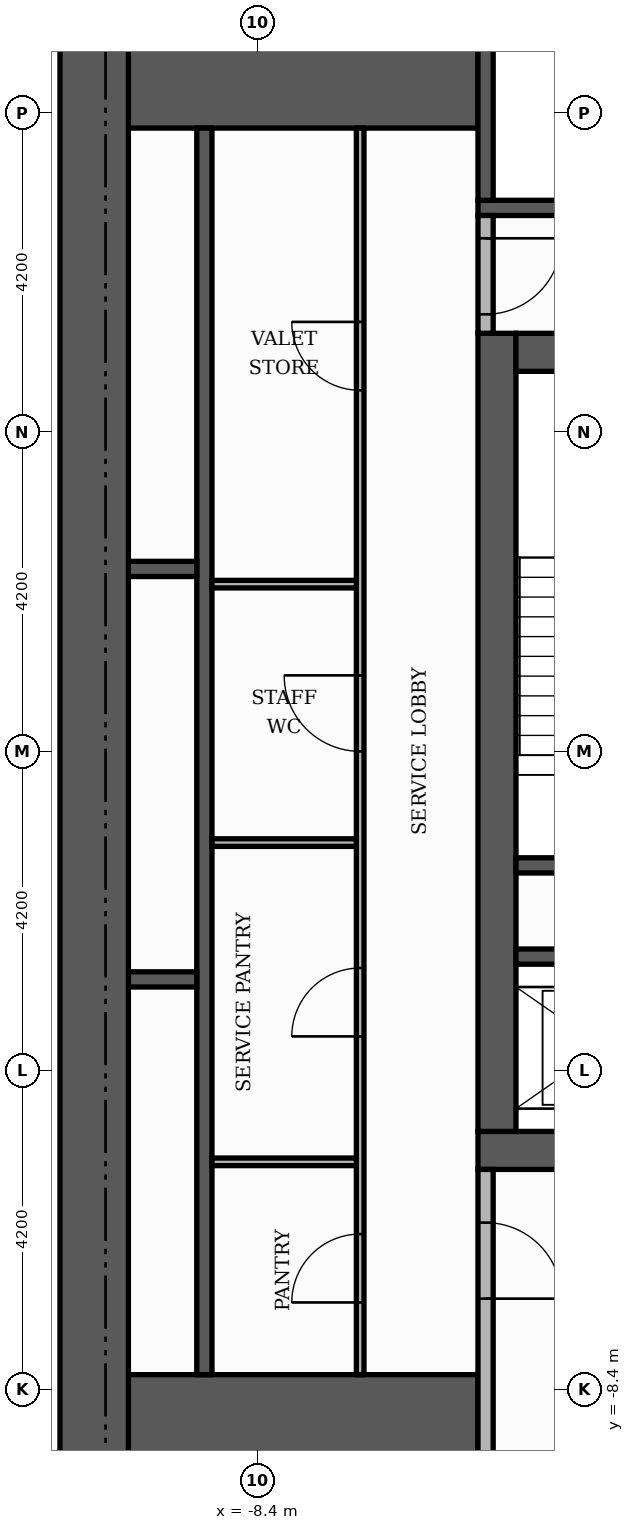
"""IFC4 building model, lengths in metres.
Left out: names, types, materials, properties, quantities, classifications, styles, units other than length and angle.
Written with IfcOpenShell. Run it as: python <this file> out.ifc"""

import sys

from ifc_helpers import new_model, si_unit, direction, frame, frame_2d, origin, place, context, subcontext, project, spatial, rectangle, extrude, element, fill, save


model = new_model("IFC4")
c1 = context("Model", 3, precision=1e-05, world=origin(), true_north=direction((0.0, 1.0)))
c2 = subcontext(c1, "Body", "Model", "MODEL_VIEW")
j1 = project(units=[si_unit("LENGTHUNIT", "METRE"), si_unit("PLANEANGLEUNIT", "RADIAN")], contexts=[c1])
p1 = place(None, origin())
s1 = spatial("IfcSite", under=j1, at=p1, CompositionType="ELEMENT")
p2 = place(p1, origin())
s2 = spatial("IfcBuilding", under=s1, at=p2, CompositionType="ELEMENT")
p3 = place(p2, frame((0.0, 0.0, 219.6)))
s3 = spatial("IfcBuildingStorey", under=s2, at=p3, CompositionType="ELEMENT", Elevation=219.6)
p4 = place(p3, frame((-5.5, -5.25, 0.0), z_axis=(0.0, 0.0, 1.0), x_axis=(1.0, 0.0, 0.0)))
e1 = element("IfcWall", 1, at=p4, inside=s3, PredefinedType="SHEAR", context=c2, shape_type="SweptSolid", body=[
    extrude(rectangle(XDim=11.0, YDim=0.5, at=frame_2d((5.5, 0.0))), origin(), (0.0, 0.0, 1.0), 3.48),
])
p5 = place(p4, frame((4.9, 0.0, 0.0)))
e2 = element("IfcOpeningElement", 2, at=p5, cuts=e1, PredefinedType="OPENING", context=c2, shape_type="SweptSolid", body=[
    extrude(rectangle(XDim=1.2, YDim=2.1, at=frame_2d((0.6, 1.05))), frame((0.0, 0.26, 0.0), z_axis=(0.0, -1.0, 0.0), x_axis=(1.0, 0.0, 0.0)), (0.0, 0.0, 1.0), 0.52),
])
p6 = place(p3, frame((-5.25, -5.0, 0.0), z_axis=(0.0, 0.0, 1.0), x_axis=(0.0, 1.0, 0.0)))
e3 = element("IfcWall", 3, at=p6, inside=s3, PredefinedType="SHEAR", context=c2, shape_type="SweptSolid", body=[
    extrude(rectangle(XDim=10.5, YDim=0.5, at=frame_2d((5.25, 0.0))), origin(), (0.0, 0.0, 1.0), 3.48),
])
p7 = place(p3, frame((-5.0, 5.25, 0.0), z_axis=(0.0, 0.0, 1.0), x_axis=(1.0, 0.0, 0.0)))
e4 = element("IfcWall", 4, at=p7, inside=s3, PredefinedType="SHEAR", context=c2, shape_type="SweptSolid", body=[
    extrude(rectangle(XDim=10.0, YDim=0.5, at=frame_2d((5.0, 0.0))), origin(), (0.0, 0.0, 1.0), 3.48),
])
p8 = place(p7, frame((4.4, 0.0, 0.0)))
e5 = element("IfcOpeningElement", 5, at=p8, cuts=e4, PredefinedType="OPENING", context=c2, shape_type="SweptSolid", body=[
    extrude(rectangle(XDim=1.2, YDim=2.1, at=frame_2d((0.6, 1.05))), frame((0.0, 0.26, 0.0), z_axis=(0.0, -1.0, 0.0), x_axis=(1.0, 0.0, 0.0)), (0.0, 0.0, 1.0), 0.52),
])
for number, where, z_axis, x_axis in (
    (6, (-10.1, -9.15, 0.0), (0.0, 0.0, 1.0), (1.0, 0.0, 0.0)),
    (7, (-10.1, 9.15, 0.0), (0.0, 0.0, 1.0), (1.0, 0.0, 0.0)),
):
    element("IfcWall", number, at=place(p3, frame(where, z_axis=z_axis, x_axis=x_axis)), inside=s3, PredefinedType="SHEAR", context=c2, shape_type="SweptSolid", body=[
        extrude(rectangle(XDim=4.6, YDim=1.9, at=frame_2d((2.3, 0.0))), origin(), (0.0, 0.0, 1.0), 3.48),
    ])
p9 = place(p3, frame((-5.0, -1.5, 0.0), z_axis=(0.0, 0.0, 1.0), x_axis=(1.0, 0.0, 0.0)))
e8 = element("IfcWall", 8, at=p9, inside=s3, PredefinedType="SHEAR", context=c2, shape_type="SweptSolid", body=[
    extrude(rectangle(XDim=3.05, YDim=0.2, at=frame_2d((1.525, 0.0))), origin(), (0.0, 0.0, 1.0), 3.48),
])
p10 = place(p3, frame((-5.5, 7.15, 0.0), z_axis=(0.0, 0.0, 1.0), x_axis=(1.0, 0.0, 0.0)))
e9 = element("IfcWall", 9, at=p10, inside=s3, PredefinedType="SHEAR", context=c2, shape_type="SweptSolid", body=[
    extrude(rectangle(XDim=6.8, YDim=0.2, at=frame_2d((3.4, 0.0))), origin(), (0.0, 0.0, 1.0), 3.48),
])
p11 = place(p3, frame((-5.4, 7.25, 0.0), z_axis=(0.0, 0.0, 1.0), x_axis=(0.0, 1.0, 0.0)))
e10 = element("IfcWall", 10, at=p11, inside=s3, PredefinedType="SHEAR", context=c2, shape_type="SweptSolid", body=[
    extrude(rectangle(XDim=2.85, YDim=0.2, at=frame_2d((1.425, 0.0))), origin(), (0.0, 0.0, 1.0), 3.48),
])
p12 = place(p3, frame((-9.1, -8.2, 0.0), z_axis=(0.0, 0.0, 1.0), x_axis=(0.0, 1.0, 0.0)))
e11 = element("IfcWall", 11, at=p12, inside=s3, PredefinedType="SHEAR", context=c2, shape_type="SweptSolid", body=[
    extrude(rectangle(XDim=16.4, YDim=0.2, at=frame_2d((8.2, 0.0))), origin(), (0.0, 0.0, 1.0), 3.48),
])
p13 = place(p3, frame((-10.1, -3.0, 0.0), z_axis=(0.0, 0.0, 1.0), x_axis=(1.0, 0.0, 0.0)))
e12 = element("IfcWall", 12, at=p13, inside=s3, PredefinedType="SHEAR", context=c2, shape_type="SweptSolid", body=[
    extrude(rectangle(XDim=0.9, YDim=0.2, at=frame_2d((0.45, 0.0))), origin(), (0.0, 0.0, 1.0), 3.48),
])
p14 = place(p3, frame((-5.0, -2.7, 0.0), z_axis=(0.0, 0.0, 1.0), x_axis=(1.0, 0.0, 0.0)))
e13 = element("IfcWall", 13, at=p14, inside=s3, PredefinedType="SHEAR", context=c2, shape_type="SweptSolid", body=[
    extrude(rectangle(XDim=2.85, YDim=0.2, at=frame_2d((1.425, 0.0))), origin(), (0.0, 0.0, 1.0), 3.48),
])
p15 = place(p3, frame((-10.1, 2.4, 0.0), z_axis=(0.0, 0.0, 1.0), x_axis=(1.0, 0.0, 0.0)))
e14 = element("IfcWall", 14, at=p15, inside=s3, PredefinedType="SHEAR", context=c2, shape_type="SweptSolid", body=[
    extrude(rectangle(XDim=0.9, YDim=0.2, at=frame_2d((0.45, 0.0))), origin(), (0.0, 0.0, 1.0), 3.48),
])
p16 = place(p3, frame((-10.55, -10.1, 0.0), z_axis=(0.0, 0.0, 1.0), x_axis=(0.0, 1.0, 0.0)))
e15 = element("IfcWall", 15, at=p16, inside=s3, PredefinedType="SHEAR", context=c2, shape_type="SweptSolid", body=[
    extrude(rectangle(XDim=20.2, YDim=0.9, at=frame_2d((10.1, 0.0))), origin(), (0.0, 0.0, 1.0), 3.48),
])
p17 = place(p3, frame((-5.4, -10.1, 0.0), z_axis=(0.0, 0.0, 1.0), x_axis=(0.0, 1.0, 0.0)))
e16 = element("IfcWall", 16, at=p17, inside=s3, PredefinedType="PARTITIONING", context=c2, shape_type="SweptSolid", body=[
    extrude(rectangle(XDim=4.6, YDim=0.2, at=frame_2d((2.3, 0.0))), origin(), (0.0, 0.0, 1.0), 3.48),
])
p18 = place(p17, frame((2.9, 0.0, 0.0)))
e17 = element("IfcOpeningElement", 17, at=p18, cuts=e16, PredefinedType="OPENING", context=c2, shape_type="SweptSolid", body=[
    extrude(rectangle(XDim=1.0, YDim=2.1, at=frame_2d((0.5, 1.05))), frame((0.0, 0.11, 0.0), z_axis=(0.0, -1.0, 0.0), x_axis=(1.0, 0.0, 0.0)), (0.0, 0.0, 1.0), 0.22),
])
p19 = place(p3, frame((-7.05, -8.2, 0.0), z_axis=(0.0, 0.0, 1.0), x_axis=(0.0, 1.0, 0.0)))
e18 = element("IfcWall", 18, at=p19, inside=s3, PredefinedType="PARTITIONING", context=c2, shape_type="SweptSolid", body=[
    extrude(rectangle(XDim=16.4, YDim=0.1, at=frame_2d((8.2, 0.0))), origin(), (0.0, 0.0, 1.0), 3.48),
])
p20 = place(p19, frame((0.95, 0.0, 0.0)))
e19 = element("IfcOpeningElement", 19, at=p20, cuts=e18, PredefinedType="OPENING", context=c2, shape_type="SweptSolid", body=[
    extrude(rectangle(XDim=0.9, YDim=2.1, at=frame_2d((0.45, 1.05))), frame((0.0, 0.06, 0.0), z_axis=(0.0, -1.0, 0.0), x_axis=(1.0, 0.0, 0.0)), (0.0, 0.0, 1.0), 0.12),
])
p21 = place(p19, frame((4.45, 0.0, 0.0)))
e20 = element("IfcOpeningElement", 20, at=p21, cuts=e18, PredefinedType="OPENING", context=c2, shape_type="SweptSolid", body=[
    extrude(rectangle(XDim=0.9, YDim=2.1, at=frame_2d((0.45, 1.05))), frame((0.0, 0.06, 0.0), z_axis=(0.0, -1.0, 0.0), x_axis=(1.0, 0.0, 0.0)), (0.0, 0.0, 1.0), 0.12),
])
p22 = place(p19, frame((8.2, 0.0, 0.0)))
e21 = element("IfcOpeningElement", 21, at=p22, cuts=e18, PredefinedType="OPENING", context=c2, shape_type="SweptSolid", body=[
    extrude(rectangle(XDim=1.0, YDim=2.1, at=frame_2d((0.5, 1.05))), frame((0.0, 0.06, 0.0), z_axis=(0.0, -1.0, 0.0), x_axis=(1.0, 0.0, 0.0)), (0.0, 0.0, 1.0), 0.12),
])
p23 = place(p19, frame((12.95, 0.0, 0.0)))
e22 = element("IfcOpeningElement", 22, at=p23, cuts=e18, PredefinedType="OPENING", context=c2, shape_type="SweptSolid", body=[
    extrude(rectangle(XDim=0.9, YDim=2.1, at=frame_2d((0.45, 1.05))), frame((0.0, 0.06, 0.0), z_axis=(0.0, -1.0, 0.0), x_axis=(1.0, 0.0, 0.0)), (0.0, 0.0, 1.0), 0.12),
])
for number, where, z_axis, x_axis in (
    (23, (-9.0, -5.4, 0.0), (0.0, 0.0, 1.0), (1.0, 0.0, 0.0)),
    (24, (-9.0, -1.2, 0.0), (0.0, 0.0, 1.0), (1.0, 0.0, 0.0)),
    (25, (-9.0, 2.2, 0.0), (0.0, 0.0, 1.0), (1.0, 0.0, 0.0)),
):
    element("IfcWall", number, at=place(p3, frame(where, z_axis=z_axis, x_axis=x_axis)), inside=s3, PredefinedType="PARTITIONING", context=c2, shape_type="SweptSolid", body=[
        extrude(rectangle(XDim=1.9, YDim=0.1, at=frame_2d((0.95, 0.0))), origin(), (0.0, 0.0, 1.0), 3.48),
    ])
p24 = place(p3, frame((-5.4, 5.5, 0.0), z_axis=(0.0, 0.0, 1.0), x_axis=(0.0, 1.0, 0.0)))
e26 = element("IfcWall", 26, at=p24, inside=s3, PredefinedType="PARTITIONING", context=c2, shape_type="SweptSolid", body=[
    extrude(rectangle(XDim=1.55, YDim=0.2, at=frame_2d((0.775, 0.0))), origin(), (0.0, 0.0, 1.0), 3.48),
])
p25 = place(p24, frame((0.25, 0.0, 0.0)))
e27 = element("IfcOpeningElement", 27, at=p25, cuts=e26, PredefinedType="OPENING", context=c2, shape_type="SweptSolid", body=[
    extrude(rectangle(XDim=1.0, YDim=2.1, at=frame_2d((0.5, 1.05))), frame((0.0, 0.11, 0.0), z_axis=(0.0, -1.0, 0.0), x_axis=(1.0, 0.0, 0.0)), (0.0, 0.0, 1.0), 0.22),
])
p26 = place(p25, frame((1.0, 0.0, 0.0), z_axis=(0.0, 0.0, 1.0), x_axis=(-1.0, 0.0, 0.0)))
e28 = element("IfcDoor", 28, at=p26, inside=s3, OperationType="SINGLE_SWING_RIGHT", PredefinedType="DOOR", context=c2, shape_type="SweptSolid", body=[
    extrude(rectangle(XDim=1.0, YDim=2.1, at=frame_2d((0.5, 1.05))), frame((0.0, 0.025, 0.0), z_axis=(0.0, -1.0, 0.0), x_axis=(1.0, 0.0, 0.0)), (0.0, 0.0, 1.0), 0.05),
])
fill(e27, e28)
p27 = place(p18, frame((1.0, 0.0, 0.0), z_axis=(0.0, 0.0, 1.0), x_axis=(-1.0, 0.0, 0.0)))
e29 = element("IfcDoor", 29, at=p27, inside=s3, OperationType="SINGLE_SWING_LEFT", PredefinedType="DOOR", context=c2, shape_type="SweptSolid", body=[
    extrude(rectangle(XDim=1.0, YDim=2.1, at=frame_2d((0.5, 1.05))), frame((0.0, 0.025, 0.0), z_axis=(0.0, -1.0, 0.0), x_axis=(1.0, 0.0, 0.0)), (0.0, 0.0, 1.0), 0.05),
])
fill(e17, e29)
p28 = place(p20, origin())
e30 = element("IfcDoor", 30, at=p28, inside=s3, OperationType="SINGLE_SWING_LEFT", PredefinedType="DOOR", context=c2, shape_type="SweptSolid", body=[
    extrude(rectangle(XDim=0.9, YDim=2.1, at=frame_2d((0.45, 1.05))), frame((0.0, 0.025, 0.0), z_axis=(0.0, -1.0, 0.0), x_axis=(1.0, 0.0, 0.0)), (0.0, 0.0, 1.0), 0.05),
])
fill(e19, e30)
p29 = place(p21, origin())
e31 = element("IfcDoor", 31, at=p29, inside=s3, OperationType="SINGLE_SWING_LEFT", PredefinedType="DOOR", context=c2, shape_type="SweptSolid", body=[
    extrude(rectangle(XDim=0.9, YDim=2.1, at=frame_2d((0.45, 1.05))), frame((0.0, 0.025, 0.0), z_axis=(0.0, -1.0, 0.0), x_axis=(1.0, 0.0, 0.0)), (0.0, 0.0, 1.0), 0.05),
])
fill(e20, e31)
p30 = place(p22, origin())
e32 = element("IfcDoor", 32, at=p30, inside=s3, OperationType="SINGLE_SWING_RIGHT", PredefinedType="DOOR", context=c2, shape_type="SweptSolid", body=[
    extrude(rectangle(XDim=1.0, YDim=2.1, at=frame_2d((0.5, 1.05))), frame((0.0, 0.025, 0.0), z_axis=(0.0, -1.0, 0.0), x_axis=(1.0, 0.0, 0.0)), (0.0, 0.0, 1.0), 0.05),
])
fill(e21, e32)
p31 = place(p23, origin())
e33 = element("IfcDoor", 33, at=p31, inside=s3, OperationType="SINGLE_SWING_RIGHT", PredefinedType="DOOR", context=c2, shape_type="SweptSolid", body=[
    extrude(rectangle(XDim=0.9, YDim=2.1, at=frame_2d((0.45, 1.05))), frame((0.0, 0.025, 0.0), z_axis=(0.0, -1.0, 0.0), x_axis=(1.0, 0.0, 0.0)), (0.0, 0.0, 1.0), 0.05),
])
fill(e22, e33)
save(model, sys.argv[1])
